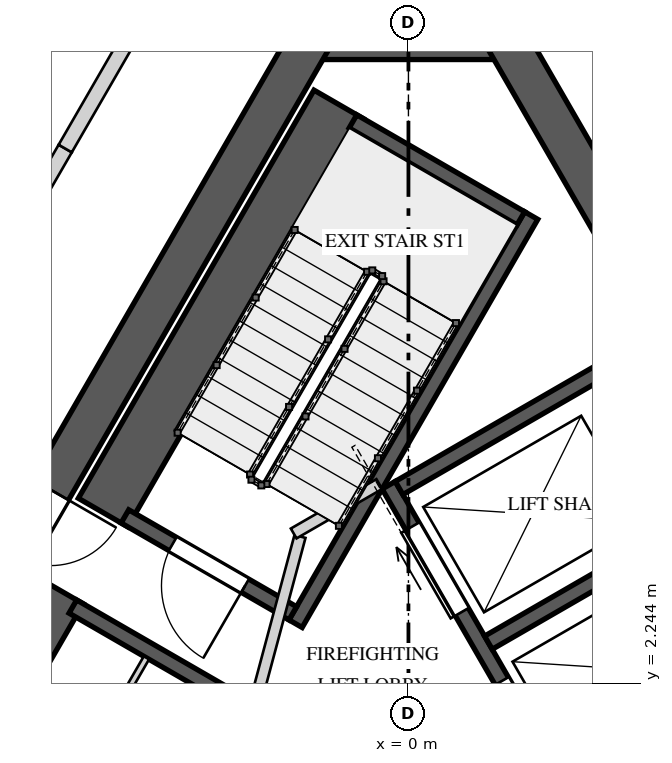
"""IFC4 building model, lengths in metres.
Left out: names, types, materials, properties, quantities, classifications, styles, units other than length and angle.
Written with IfcOpenShell. Run it as: python <this file> out.ifc"""

import sys

from ifc_helpers import new_model, si_unit, direction, frame, frame_2d, origin, place, context, subcontext, project, spatial, rectangle, extrude, element, fill, save


model = new_model("IFC4")
c1 = context("Model", 3, precision=1e-05, world=origin(), true_north=direction((0.0, 1.0)))
c2 = subcontext(c1, "Body", "Model", "MODEL_VIEW")
j1 = project(units=[si_unit("LENGTHUNIT", "METRE"), si_unit("PLANEANGLEUNIT", "RADIAN")], contexts=[c1])
p1 = place(None, origin())
s1 = spatial("IfcSite", under=j1, at=p1, CompositionType="ELEMENT")
p2 = place(p1, origin())
s2 = spatial("IfcBuilding", under=s1, at=p2, CompositionType="ELEMENT")
p3 = place(p2, frame((0.0, 0.0, 348.4)))
s3 = spatial("IfcBuildingStorey", under=s2, at=p3, CompositionType="ELEMENT", Elevation=348.4)
p4 = place(p3, frame((1.443, 10.725, 0.0), z_axis=(0.0, 0.0, 1.0), x_axis=(-1.0, 0.0, 0.0)))
e1 = element("IfcWall", 1, at=p4, inside=s3, PredefinedType="SHEAR", context=c2, shape_type="SweptSolid", body=[
    extrude(rectangle(XDim=2.887, YDim=0.55, at=frame_2d((1.443, 0.0))), origin(), (0.0, 0.0, 1.0), 4.0),
])
p5 = place(p3, frame((-1.285, 10.725, 0.0), z_axis=(0.0, 0.0, 1.0), x_axis=(-0.499994590896, -0.86602852671, 0.0)))
e2 = element("IfcWall", 2, at=p5, inside=s3, PredefinedType="SHEAR", context=c2, shape_type="SweptSolid", body=[
    extrude(rectangle(XDim=17.292, YDim=0.55, at=frame_2d((8.646, 0.0))), origin(), (0.0, 0.0, 1.0), 4.0),
])
p6 = place(p5, frame((6.851, 0.0, 0.0)))
e3 = element("IfcOpeningElement", 3, at=p6, cuts=e2, PredefinedType="OPENING", context=c2, shape_type="SweptSolid", body=[
    extrude(rectangle(XDim=1.0, YDim=2.4, at=frame_2d((0.5, 1.2))), frame((0.0, 0.285, 0.0), z_axis=(0.0, -1.0, 0.0), x_axis=(1.0, 0.0, 0.0)), (0.0, 0.0, 1.0), 0.57),
])
p7 = place(p5, frame((15.089, 0.0, 0.0)))
e4 = element("IfcOpeningElement", 4, at=p7, cuts=e2, PredefinedType="OPENING", context=c2, shape_type="SweptSolid", body=[
    extrude(rectangle(XDim=0.8, YDim=2.1, at=frame_2d((0.4, 1.05))), frame((0.0, 0.285, 0.0), z_axis=(0.0, -1.0, 0.0), x_axis=(1.0, 0.0, 0.0)), (0.0, 0.0, 1.0), 0.57),
])
p8 = place(p3, frame((9.93, -4.25, 0.0), z_axis=(0.0, 0.0, 1.0), x_axis=(-0.499994590896, 0.86602852671, 0.0)))
e5 = element("IfcWall", 5, at=p8, inside=s3, PredefinedType="SHEAR", context=c2, shape_type="SweptSolid", body=[
    extrude(rectangle(XDim=17.292, YDim=0.55, at=frame_2d((8.646, 0.0))), origin(), (0.0, 0.0, 1.0), 4.0),
])
p9 = place(p8, frame((6.921, 0.0, 0.0)))
e6 = element("IfcOpeningElement", 6, at=p9, cuts=e5, PredefinedType="OPENING", context=c2, shape_type="SweptSolid", body=[
    extrude(rectangle(XDim=1.0, YDim=2.4, at=frame_2d((0.5, 1.2))), frame((0.0, 0.285, 0.0), z_axis=(0.0, -1.0, 0.0), x_axis=(1.0, 0.0, 0.0)), (0.0, 0.0, 1.0), 0.57),
])
p10 = place(p3, frame((-0.918, 9.86, 0.0), z_axis=(0.0, 0.0, 1.0), x_axis=(-0.500026960575, -0.86600983753, 0.0)))
e7 = element("IfcWall", 7, at=p10, inside=s3, PredefinedType="SOLIDWALL", context=c2, shape_type="SweptSolid", body=[
    extrude(rectangle(XDim=6.2, YDim=0.75, at=frame_2d((3.1, 0.0))), origin(), (0.0, 0.0, 1.0), 3.65),
])
p11 = place(p3, frame((1.615, 8.397, 0.0), z_axis=(0.0, 0.0, 1.0), x_axis=(-0.500009909098, -0.866019682689, 0.0)))
e8 = element("IfcWall", 8, at=p11, inside=s3, PredefinedType="SOLIDWALL", context=c2, shape_type="SweptSolid", body=[
    extrude(rectangle(XDim=6.2, YDim=0.2, at=frame_2d((3.1, 0.0))), origin(), (0.0, 0.0, 1.0), 3.65),
])
p12 = place(p3, frame((1.479, 8.361, 0.0), z_axis=(0.0, 0.0, 1.0), x_axis=(-0.865989465428, 0.500062241894, 0.0)))
e9 = element("IfcWall", 9, at=p12, inside=s3, PredefinedType="SOLIDWALL", context=c2, shape_type="SweptSolid", body=[
    extrude(rectangle(XDim=2.55, YDim=0.2, at=frame_2d((1.275, 0.0))), origin(), (0.0, 0.0, 1.0), 3.65),
])
p13 = place(p3, frame((-1.521, 3.165, 0.0), z_axis=(0.0, 0.0, 1.0), x_axis=(-0.866030925526, 0.499990435942, 0.0)))
e10 = element("IfcWall", 10, at=p13, inside=s3, PredefinedType="SOLIDWALL", context=c2, shape_type="SweptSolid", body=[
    extrude(rectangle(XDim=2.55, YDim=0.2, at=frame_2d((1.275, 0.0))), origin(), (0.0, 0.0, 1.0), 3.65),
])
p14 = place(p13, frame((0.725, 0.0, 0.0)))
e11 = element("IfcOpeningElement", 11, at=p14, cuts=e10, PredefinedType="OPENING", context=c2, shape_type="SweptSolid", body=[
    extrude(rectangle(XDim=1.1, YDim=2.4, at=frame_2d((0.55, 1.2))), frame((0.0, 0.11, 0.0), z_axis=(0.0, -1.0, 0.0), x_axis=(1.0, 0.0, 0.0)), (0.0, 0.0, 1.0), 0.22),
])
p15 = place(p3, frame((-4.603, 3.477, 0.0), z_axis=(0.0, 0.0, 1.0), x_axis=(-0.500015767406, -0.866016300277, 0.0)))
e12 = element("IfcWall", 12, at=p15, inside=s3, PredefinedType="SOLIDWALL", context=c2, shape_type="SweptSolid", body=[
    extrude(rectangle(XDim=5.5, YDim=0.75, at=frame_2d((2.75, 0.0))), origin(), (0.0, 0.0, 1.0), 3.65),
])
p16 = place(p3, frame((-2.38, 2.078, 0.0), z_axis=(0.0, 0.0, 1.0), x_axis=(-0.866061024631, 0.499938297808, 0.0)))
e13 = element("IfcWall", 13, at=p16, inside=s3, PredefinedType="SOLIDWALL", context=c2, shape_type="SweptSolid", body=[
    extrude(rectangle(XDim=2.35, YDim=0.2, at=frame_2d((1.175, 0.0))), origin(), (0.0, 0.0, 1.0), 3.65),
])
p17 = place(p3, frame((-5.997, -1.838, 0.0), z_axis=(0.0, 0.0, 1.0), x_axis=(0.500005610874, 0.86602216432, 0.0)))
e14 = element("IfcWall", 14, at=p17, inside=s3, PredefinedType="PARTITIONING", context=c2, shape_type="SweptSolid", body=[
    extrude(rectangle(XDim=5.1, YDim=0.08, at=frame_2d((2.55, 0.0))), origin(), (0.0, 0.0, 1.0), 3.65),
])
p18 = place(p17, frame((1.25, 0.0, 0.0)))
e15 = element("IfcOpeningElement", 15, at=p18, cuts=e14, PredefinedType="OPENING", context=c2, shape_type="SweptSolid", body=[
    extrude(rectangle(XDim=0.8, YDim=2.1, at=frame_2d((0.4, 1.05))), frame((0.0, 0.05, 0.0), z_axis=(0.0, -1.0, 0.0), x_axis=(1.0, 0.0, 0.0)), (0.0, 0.0, 1.0), 0.1),
])
p19 = place(p3, frame((2.19, 0.606, 0.0), z_axis=(0.0, 0.0, 1.0), x_axis=(-0.500002801628, 0.866023786258, 0.0)))
e16 = element("IfcWall", 16, at=p19, inside=s3, PredefinedType="SOLIDWALL", context=c2, shape_type="SweptSolid", body=[
    extrude(rectangle(XDim=4.9, YDim=0.2, at=frame_2d((2.45, 0.0))), origin(), (0.0, 0.0, 1.0), 3.65),
])
p20 = place(p19, frame((0.625, 0.0, 0.0)))
e17 = element("IfcOpeningElement", 17, at=p20, cuts=e16, PredefinedType="OPENING", context=c2, shape_type="SweptSolid", body=[
    extrude(rectangle(XDim=1.3, YDim=2.1, at=frame_2d((0.65, 1.05))), frame((0.0, 0.11, 0.0), z_axis=(0.0, -1.0, 0.0), x_axis=(1.0, 0.0, 0.0)), (0.0, 0.0, 1.0), 0.22),
])
p21 = place(p19, frame((2.975, 0.0, 0.0)))
e18 = element("IfcOpeningElement", 18, at=p21, cuts=e16, PredefinedType="OPENING", context=c2, shape_type="SweptSolid", body=[
    extrude(rectangle(XDim=1.3, YDim=2.1, at=frame_2d((0.65, 1.05))), frame((0.0, 0.11, 0.0), z_axis=(0.0, -1.0, 0.0), x_axis=(1.0, 0.0, 0.0)), (0.0, 0.0, 1.0), 0.22),
])
for number, where, z_axis, x_axis in (
    (19, (2.227, 0.743, 0.0), (0.0, 0.0, 1.0), (0.866, 0.5, 0.0)),
    (20, (1.052, 2.778, 0.0), (0.0, 0.0, 1.0), (0.866, 0.5, 0.0)),
    (21, (-0.123, 4.813, 0.0), (0.0, 0.0, 1.0), (0.866, 0.5, 0.0)),
):
    element("IfcWall", number, at=place(p3, frame(where, z_axis=z_axis, x_axis=x_axis)), inside=s3, PredefinedType="SOLIDWALL", context=c2, shape_type="SweptSolid", body=[
        extrude(rectangle(XDim=3.15, YDim=0.2, at=frame_2d((1.575, 0.0))), origin(), (0.0, 0.0, 1.0), 3.65),
    ])
p22 = place(p3, frame((-2.178, 1.372, 0.0), z_axis=(0.0, 0.0, 1.0), x_axis=(0.258808958833, 0.96592852884, 0.0)))
e22 = element("IfcWall", 22, at=p22, inside=s3, PredefinedType="PARTITIONING", context=c2, shape_type="SweptSolid", body=[
    extrude(rectangle(XDim=2.903, YDim=0.15, at=frame_2d((1.451, 0.0))), origin(), (0.0, 0.0, 1.0), 3.65),
])
p23 = place(p3, frame((-1.51, 4.215, 0.0), z_axis=(0.0, 0.0, 1.0), x_axis=(0.866085525409, 0.49989585183, 0.0)))
e23 = element("IfcWall", 23, at=p23, inside=s3, PredefinedType="PARTITIONING", context=c2, shape_type="SweptSolid", body=[
    extrude(rectangle(XDim=1.3, YDim=0.15, at=frame_2d((0.65, 0.0))), origin(), (0.0, 0.0, 1.0), 3.65),
])
p24 = place(p3, frame((-4.929, 8.563, 0.0), z_axis=(0.0, 0.0, 1.0), x_axis=(0.500046299512, 0.865998671098, 0.0)))
e24 = element("IfcWall", 24, at=p24, inside=s3, PredefinedType="SOLIDWALL", context=c2, shape_type="SweptSolid", body=[
    extrude(rectangle(XDim=0.827, YDim=0.2, at=frame_2d((0.413, 0.0))), origin(), (0.0, 0.0, 1.0), 2.95),
])
p25 = place(p3, frame((-4.515, 9.279, 0.0), z_axis=(0.0, 0.0, 1.0), x_axis=(0.499975428181, 0.866039589866, 0.0)))
e25 = element("IfcWall", 25, at=p25, inside=s3, PredefinedType="SOLIDWALL", context=c2, shape_type="SweptSolid", body=[
    extrude(rectangle(XDim=4.066, YDim=0.2, at=frame_2d((2.033, 0.0))), origin(), (0.0, 0.0, 1.0), 3.65),
])
p26 = place(p3, frame((2.483, 12.8, 0.0), z_axis=(0.0, 0.0, 1.0), x_axis=(0.499982771656, -0.866035350345, 0.0)))
e26 = element("IfcWall", 26, at=p26, inside=s3, PredefinedType="SOLIDWALL", context=c2, shape_type="SweptSolid", body=[
    extrude(rectangle(XDim=4.195, YDim=0.2, at=frame_2d((2.097, 0.0))), origin(), (0.0, 0.0, 1.0), 3.65),
])
p27 = place(p14, origin())
e27 = element("IfcDoor", 27, at=p27, inside=s3, OperationType="SINGLE_SWING_RIGHT", PredefinedType="DOOR", context=c2, shape_type="SweptSolid", body=[
    extrude(rectangle(XDim=1.1, YDim=2.4, at=frame_2d((0.55, 1.2))), frame((0.0, 0.025, 0.0), z_axis=(0.0, -1.0, 0.0), x_axis=(1.0, 0.0, 0.0)), (0.0, 0.0, 1.0), 0.05),
])
fill(e11, e27)
p28 = place(p20, origin())
e28 = element("IfcDoor", 28, at=p28, inside=s3, OperationType="SLIDING_TO_LEFT", PredefinedType="DOOR", context=c2, shape_type="SweptSolid", body=[
    extrude(rectangle(XDim=1.3, YDim=2.1, at=frame_2d((0.65, 1.05))), frame((0.0, 0.025, 0.0), z_axis=(0.0, -1.0, 0.0), x_axis=(1.0, 0.0, 0.0)), (0.0, 0.0, 1.0), 0.05),
])
fill(e17, e28)
p29 = place(p21, origin())
e29 = element("IfcDoor", 29, at=p29, inside=s3, OperationType="SLIDING_TO_RIGHT", PredefinedType="DOOR", context=c2, shape_type="SweptSolid", body=[
    extrude(rectangle(XDim=1.3, YDim=2.1, at=frame_2d((0.65, 1.05))), frame((0.0, 0.025, 0.0), z_axis=(0.0, -1.0, 0.0), x_axis=(1.0, 0.0, 0.0)), (0.0, 0.0, 1.0), 0.05),
])
fill(e18, e29)
save(model, sys.argv[1])
